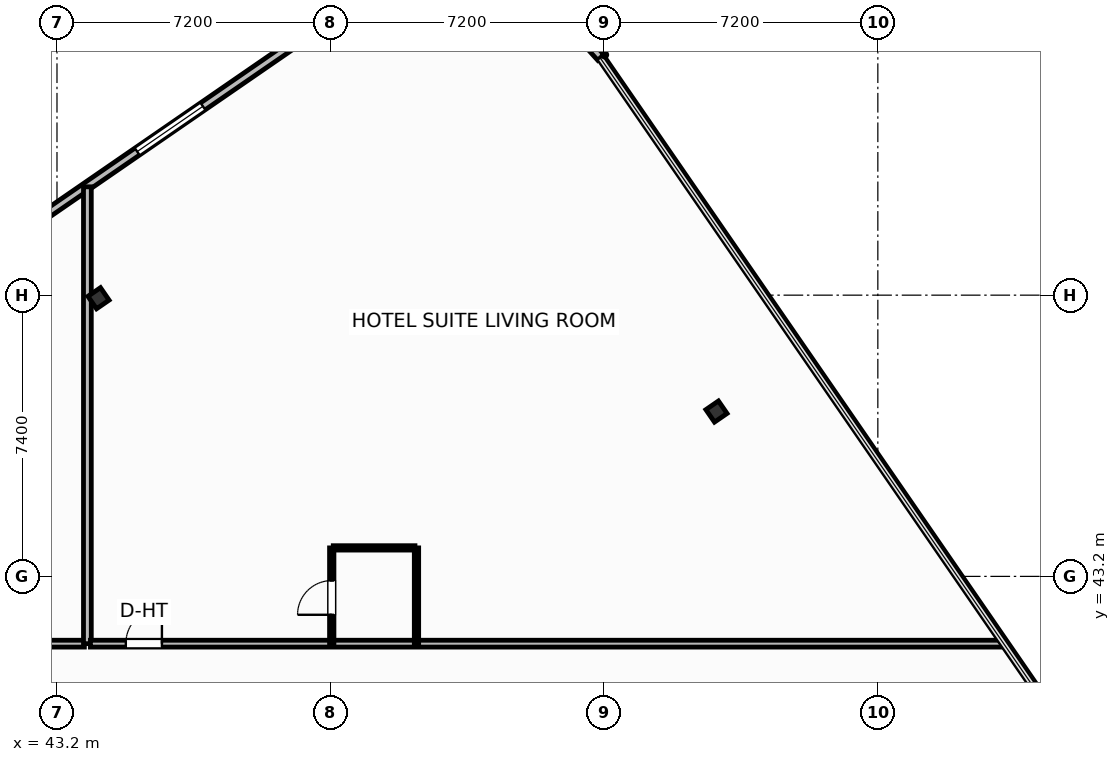
"""IFC4 building model, lengths in metres.
Left out: names, types, materials, properties, quantities, classifications, styles, units other than length and angle.
Written with IfcOpenShell. Run it as: python <this file> out.ifc"""

import sys

from ifc_helpers import new_model, si_unit, direction, frame, frame_2d, origin, origin_2d, place, context, subcontext, project, spatial, rectangle, i_section, extrude, element, fill, save


model = new_model("IFC4")
c1 = context("Model", 3, precision=1e-05, world=origin(), true_north=direction((0.0, 1.0)))
c2 = subcontext(c1, "Body", "Model", "MODEL_VIEW")
j1 = project(units=[si_unit("LENGTHUNIT", "METRE"), si_unit("PLANEANGLEUNIT", "RADIAN")], contexts=[c1])
p1 = place(None, origin())
s1 = spatial("IfcSite", under=j1, at=p1, CompositionType="ELEMENT")
p2 = place(p1, origin())
s2 = spatial("IfcBuilding", under=s1, at=p2, CompositionType="ELEMENT")
p3 = place(p2, frame((0.0, 0.0, 258.2)))
s3 = spatial("IfcBuildingStorey", under=s2, at=p3, CompositionType="ELEMENT", Elevation=258.2)
for number, where, z_axis, x_axis in (
    (1, (60.554, 47.537, 0.0), (0.0, 0.0, 1.0), (0.824, 0.567, 0.0)),
    (2, (44.292, 50.519, 0.0), (0.0, 0.0, 1.0), (0.824, 0.567, 0.0)),
):
    element("IfcColumn", number, at=place(p3, frame(where, z_axis=z_axis, x_axis=x_axis)), inside=s3, PredefinedType="COLUMN", context=c2, shape_type="SweptSolid", body=[
        extrude(i_section(OverallWidth=0.401, OverallDepth=0.399, WebThickness=0.025, FlangeThickness=0.04, FilletRadius=0.022, at=origin_2d()), origin(), (0.0, 0.0, 1.0), 3.7),
    ])
p4 = place(p3, frame((57.51, 56.855, 0.0), z_axis=(0.0, 0.0, 1.0), x_axis=(-0.669853727156, 0.742493086982, 0.0)))
e3 = element("IfcWall", 3, at=p4, inside=s3, PredefinedType="SOLIDWALL", context=c2, shape_type="SweptSolid", body=[
    extrude(rectangle(XDim=1.274, YDim=0.22, at=frame_2d((0.637, 0.0))), origin(), (0.0, 0.0, 1.0), 2.73),
])
p5 = place(p3, frame((50.697, 58.087, 0.0), z_axis=(0.0, 0.0, 1.0), x_axis=(-0.823539455464, -0.567258993137, 0.0)))
e4 = element("IfcWall", 4, at=p5, inside=s3, PredefinedType="SOLIDWALL", context=c2, shape_type="SweptSolid", body=[
    extrude(rectangle(XDim=10.98, YDim=0.22, at=frame_2d((5.49, 0.0))), origin(), (0.0, 0.0, 1.0), 2.73),
])
p6 = place(p5, frame((4.44, 0.0, 0.8)))
e5 = element("IfcOpeningElement", 5, at=p6, cuts=e4, PredefinedType="OPENING", context=c2, shape_type="SweptSolid", body=[
    extrude(rectangle(XDim=2.1, YDim=1.75, at=frame_2d((1.05, 0.875))), frame((0.0, 0.12, 0.0), z_axis=(0.0, -1.0, 0.0), x_axis=(1.0, 0.0, 0.0)), (0.0, 0.0, 1.0), 0.24),
])
p7 = place(p3, frame((36.58, 41.43, 0.0), z_axis=(0.0, 0.0, 1.0), x_axis=(1.0, 0.0, 0.0)))
e6 = element("IfcWall", 6, at=p7, inside=s3, PredefinedType="PARTITIONING", context=c2, shape_type="SweptSolid", body=[
    extrude(rectangle(XDim=7.34, YDim=0.18, at=frame_2d((3.67, 0.0))), origin(), (0.0, 0.0, 1.0), 3.45),
])
p8 = place(p7, frame((3.195, 0.0, 0.0)))
e7 = element("IfcOpeningElement", 7, at=p8, cuts=e6, PredefinedType="OPENING", context=c2, shape_type="SweptSolid", body=[
    extrude(rectangle(XDim=0.95, YDim=2.05, at=frame_2d((0.475, 1.025))), frame((0.0, 0.1, 0.0), z_axis=(0.0, -1.0, 0.0), x_axis=(1.0, 0.0, 0.0)), (0.0, 0.0, 1.0), 0.2),
])
p9 = place(p3, frame((44.0, 41.43, 0.0), z_axis=(0.0, 0.0, 1.0), x_axis=(0.0, 1.0, 0.0)))
e8 = element("IfcWall", 8, at=p9, inside=s3, PredefinedType="PARTITIONING", context=c2, shape_type="SweptSolid", body=[
    extrude(rectangle(XDim=12.021, YDim=0.205, at=frame_2d((6.01, 0.0))), origin(), (0.0, 0.0, 1.0), 2.739),
])
p10 = place(p3, frame((44.08, 41.43, 0.0), z_axis=(0.0, 0.0, 1.0), x_axis=(1.0, 0.0, 0.0)))
e9 = element("IfcWall", 9, at=p10, inside=s3, PredefinedType="PARTITIONING", context=c2, shape_type="SweptSolid", body=[
    extrude(rectangle(XDim=23.992, YDim=0.18, at=frame_2d((11.996, 0.0))), origin(), (0.0, 0.0, 1.0), 3.45),
])
p11 = place(p10, frame((0.931, 0.0, 0.0)))
e10 = element("IfcOpeningElement", 10, at=p11, cuts=e9, PredefinedType="OPENING", context=c2, shape_type="SweptSolid", body=[
    extrude(rectangle(XDim=0.95, YDim=2.15, at=frame_2d((0.475, 1.075))), frame((0.0, 0.1, 0.0), z_axis=(0.0, -1.0, 0.0), x_axis=(1.0, 0.0, 0.0)), (0.0, 0.0, 1.0), 0.2),
])
p12 = place(p3, frame((50.47, 43.95, 0.0), z_axis=(0.0, 0.0, 1.0), x_axis=(1.0, 0.0, 0.0)))
e11 = element("IfcWall", 11, at=p12, inside=s3, PredefinedType="PARTITIONING", context=c2, shape_type="SweptSolid", body=[
    extrude(rectangle(XDim=2.15, YDim=0.115, at=frame_2d((1.075, 0.0))), origin(), (0.0, 0.0, 1.0), 3.45),
])
p13 = place(p3, frame((50.43, 41.43, 0.0), z_axis=(0.0, 0.0, 1.0), x_axis=(0.0, 1.0, 0.0)))
e12 = element("IfcWall", 12, at=p13, inside=s3, PredefinedType="PARTITIONING", context=c2, shape_type="SweptSolid", body=[
    extrude(rectangle(XDim=2.52, YDim=0.115, at=frame_2d((1.26, 0.0))), origin(), (0.0, 0.0, 1.0), 3.45),
])
p14 = place(p13, frame((0.76, 0.0, 0.0)))
e13 = element("IfcOpeningElement", 13, at=p14, cuts=e12, PredefinedType="OPENING", context=c2, shape_type="SweptSolid", body=[
    extrude(rectangle(XDim=0.9, YDim=2.05, at=frame_2d((0.45, 1.025))), frame((0.0, 0.067, 0.0), z_axis=(0.0, -1.0, 0.0), x_axis=(1.0, 0.0, 0.0)), (0.0, 0.0, 1.0), 0.135),
])
p15 = place(p3, frame((52.66, 41.43, 0.0), z_axis=(0.0, 0.0, 1.0), x_axis=(0.0, 1.0, 0.0)))
e14 = element("IfcWall", 14, at=p15, inside=s3, PredefinedType="PARTITIONING", context=c2, shape_type="SweptSolid", body=[
    extrude(rectangle(XDim=2.52, YDim=0.115, at=frame_2d((1.26, 0.0))), origin(), (0.0, 0.0, 1.0), 3.45),
])
p16 = place(p6, origin())
e15 = element("IfcWindow", 15, at=p16, inside=s3, PartitioningType="SINGLE_PANEL", PredefinedType="WINDOW", context=c2, shape_type="SweptSolid", body=[
    extrude(rectangle(XDim=2.1, YDim=1.75, at=frame_2d((1.05, 0.875))), frame((0.0, 0.03, 0.0), z_axis=(0.0, -1.0, 0.0), x_axis=(1.0, 0.0, 0.0)), (0.0, 0.0, 1.0), 0.06),
])
fill(e5, e15)
p17 = place(p11, origin())
e16 = element("IfcDoor", 16, at=p17, inside=s3, OperationType="SINGLE_SWING_RIGHT", PredefinedType="DOOR", context=c2, shape_type="SweptSolid", body=[
    extrude(rectangle(XDim=0.95, YDim=2.15, at=frame_2d((0.475, 1.075))), frame((0.0, 0.025, 0.0), z_axis=(0.0, -1.0, 0.0), x_axis=(1.0, 0.0, 0.0)), (0.0, 0.0, 1.0), 0.05),
])
fill(e10, e16)
p18 = place(p14, origin())
e17 = element("IfcDoor", 17, at=p18, inside=s3, OperationType="SINGLE_SWING_LEFT", PredefinedType="DOOR", context=c2, shape_type="SweptSolid", body=[
    extrude(rectangle(XDim=0.9, YDim=2.05, at=frame_2d((0.45, 1.025))), frame((0.0, 0.025, 0.0), z_axis=(0.0, -1.0, 0.0), x_axis=(1.0, 0.0, 0.0)), (0.0, 0.0, 1.0), 0.05),
])
fill(e13, e17)
save(model, sys.argv[1])
